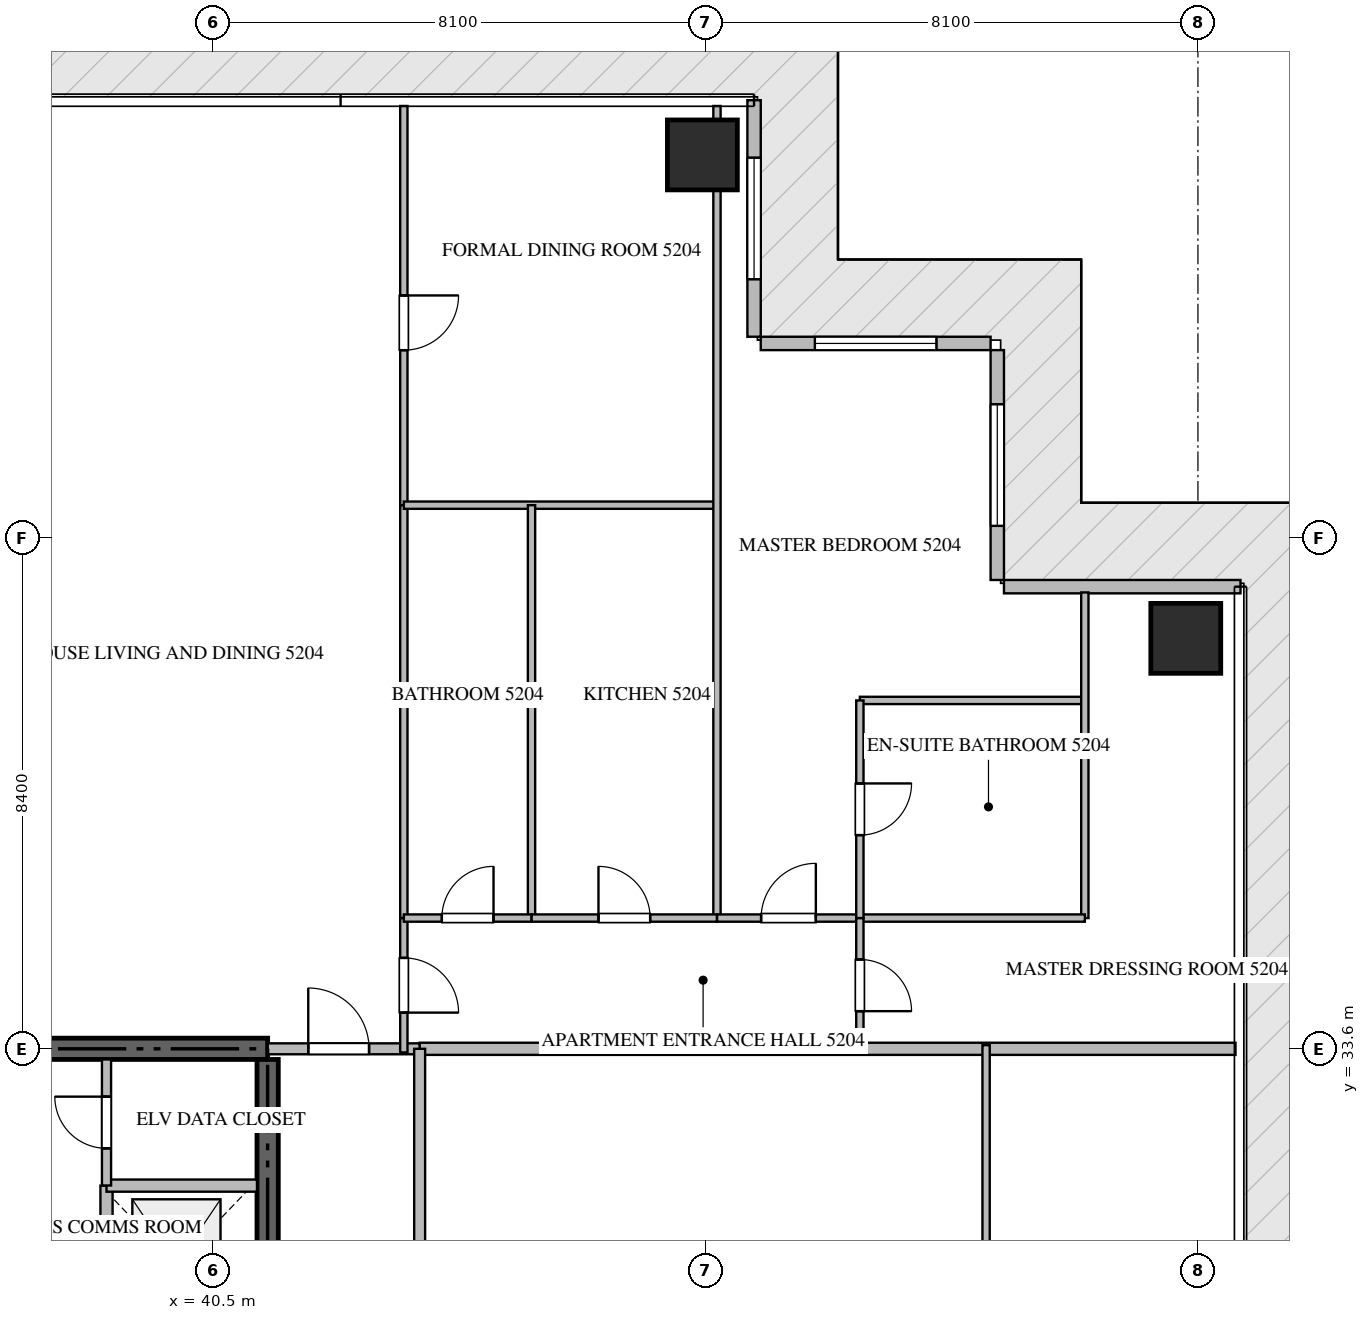
"""IFC4 building model, lengths in metres.
Left out: names, types, materials, properties, quantities, classifications, styles, units other than length and angle.
Written with IfcOpenShell. Run it as: python <this file> out.ifc"""

import sys

from ifc_helpers import new_model, si_unit, direction, frame, frame_2d, origin, origin_2d, place, context, subcontext, project, spatial, rectangle, extrude, source, transform, mapped, element, fill, save


model = new_model("IFC4")
c1 = context("Model", 3, precision=1e-05, world=origin(), true_north=direction((0.0, 1.0)))
c2 = subcontext(c1, "Body", "Model", "MODEL_VIEW")
j1 = project(units=[si_unit("LENGTHUNIT", "METRE"), si_unit("PLANEANGLEUNIT", "RADIAN")], contexts=[c1])
p1 = place(None, origin())
s1 = spatial("IfcSite", under=j1, at=p1, CompositionType="ELEMENT")
p2 = place(p1, origin())
s2 = spatial("IfcBuilding", under=s1, at=p2, CompositionType="ELEMENT")
p3 = place(p2, frame((0.0, 0.0, 210.45)))
s3 = spatial("IfcBuildingStorey", under=s2, at=p3, CompositionType="ELEMENT", Elevation=210.45)
p4 = place(p3, frame((41.4, 33.6, -0.44), z_axis=(0.0, 0.0, 1.0), x_axis=(-1.0, 0.0, 0.0)))
e1 = element("IfcWall", 1, at=p4, inside=s3, PredefinedType="SHEAR", context=c2, shape_type="SweptSolid", body=[
    extrude(rectangle(XDim=18.0, YDim=0.35, at=frame_2d((9.0, 0.0))), origin(), (0.0, 0.0, 1.0), 4.028),
])
p5 = place(p3, frame((41.4, 27.75, -0.44), z_axis=(0.0, 0.0, 1.0), x_axis=(0.0, 1.0, 0.0)))
e2 = element("IfcWall", 2, at=p5, inside=s3, PredefinedType="SHEAR", context=c2, shape_type="SweptSolid", body=[
    extrude(rectangle(XDim=5.675, YDim=0.35, at=frame_2d((2.837, 0.0))), origin(), (0.0, 0.0, 1.0), 4.028),
])
m1 = source(origin(), c2, "Body", "SweptSolid", [
    extrude(rectangle(XDim=1.15, YDim=1.15, at=origin_2d()), origin(), (0.0, 0.0, 1.0), 4.03),
])
for number, where, z_axis, x_axis in (
    (3, (48.55, 48.3, -0.44), (0.0, 0.0, 1.0), (1.0, 0.0, 0.0)),
    (4, (56.5, 40.35, -0.44), (0.0, 0.0, 1.0), (1.0, 0.0, 0.0)),
):
    element("IfcColumn", number, at=place(p3, frame(where, z_axis=z_axis, x_axis=x_axis)), inside=s3, PredefinedType="COLUMN", context=c2, shape_type="MappedRepresentation", body=[
        mapped(m1, transform((0.0, 0.0, 0.0), scale=1.0)),
    ])
p6 = place(p3, frame((57.4, 41.2, 0.0), z_axis=(0.0, 0.0, 1.0), x_axis=(-1.0, 0.0, 0.0)))
e5 = element("IfcWall", 5, at=p6, inside=s3, PredefinedType="ELEMENTEDWALL", context=c2, shape_type="SweptSolid", body=[
    extrude(rectangle(XDim=3.89, YDim=0.22, at=frame_2d((1.945, 0.0))), origin(), (0.0, 0.0, 1.0), 3.575),
])
p7 = place(p3, frame((53.4, 41.31, 0.0), z_axis=(0.0, 0.0, 1.0), x_axis=(0.0, 1.0, 0.0)))
e6 = element("IfcWall", 6, at=p7, inside=s3, PredefinedType="ELEMENTEDWALL", context=c2, shape_type="SweptSolid", body=[
    extrude(rectangle(XDim=3.78, YDim=0.22, at=frame_2d((1.89, 0.0))), origin(), (0.0, 0.0, 1.0), 3.575),
])
p8 = place(p7, frame((0.89, 0.0, 0.65)))
e7 = element("IfcOpeningElement", 7, at=p8, cuts=e6, PredefinedType="OPENING", context=c2, shape_type="SweptSolid", body=[
    extrude(rectangle(XDim=2.0, YDim=2.2, at=frame_2d((1.0, 1.1))), frame((0.0, 0.12, 0.0), z_axis=(0.0, -1.0, 0.0), x_axis=(1.0, 0.0, 0.0)), (0.0, 0.0, 1.0), 0.24),
])
p9 = place(p3, frame((53.29, 45.2, 0.0), z_axis=(0.0, 0.0, 1.0), x_axis=(-1.0, 0.0, 0.0)))
e8 = element("IfcWall", 8, at=p9, inside=s3, PredefinedType="ELEMENTEDWALL", context=c2, shape_type="SweptSolid", body=[
    extrude(rectangle(XDim=3.78, YDim=0.22, at=frame_2d((1.89, 0.0))), origin(), (0.0, 0.0, 1.0), 3.575),
])
p10 = place(p9, frame((0.89, 0.0, 0.65)))
e9 = element("IfcOpeningElement", 9, at=p10, cuts=e8, PredefinedType="OPENING", context=c2, shape_type="SweptSolid", body=[
    extrude(rectangle(XDim=2.0, YDim=2.2, at=frame_2d((1.0, 1.1))), frame((0.0, 0.12, 0.0), z_axis=(0.0, -1.0, 0.0), x_axis=(1.0, 0.0, 0.0)), (0.0, 0.0, 1.0), 0.24),
])
p11 = place(p3, frame((49.4, 45.31, 0.0), z_axis=(0.0, 0.0, 1.0), x_axis=(0.0, 1.0, 0.0)))
e10 = element("IfcWall", 10, at=p11, inside=s3, PredefinedType="ELEMENTEDWALL", context=c2, shape_type="SweptSolid", body=[
    extrude(rectangle(XDim=3.89, YDim=0.22, at=frame_2d((1.945, 0.0))), origin(), (0.0, 0.0, 1.0), 3.575),
])
p12 = place(p11, frame((0.945, 0.0, 0.65)))
e11 = element("IfcOpeningElement", 11, at=p12, cuts=e10, PredefinedType="OPENING", context=c2, shape_type="SweptSolid", body=[
    extrude(rectangle(XDim=2.0, YDim=2.2, at=frame_2d((1.0, 1.1))), frame((0.0, 0.12, 0.0), z_axis=(0.0, -1.0, 0.0), x_axis=(1.0, 0.0, 0.0)), (0.0, 0.0, 1.0), 0.24),
])
p13 = place(p3, frame((38.75, 28.85, 0.0), z_axis=(0.0, 0.0, 1.0), x_axis=(0.0, 1.0, 0.0)))
e12 = element("IfcWall", 12, at=p13, inside=s3, PredefinedType="STANDARD", context=c2, shape_type="SweptSolid", body=[
    extrude(rectangle(XDim=2.5, YDim=0.2, at=frame_2d((1.25, 0.0))), origin(), (0.0, 0.0, 1.0), 3.59),
])
p14 = place(p3, frame((38.75, 31.35, 0.0), z_axis=(0.0, 0.0, 1.0), x_axis=(1.0, 0.0, 0.0)))
e13 = element("IfcWall", 13, at=p14, inside=s3, PredefinedType="STANDARD", context=c2, shape_type="SweptSolid", body=[
    extrude(rectangle(XDim=2.475, YDim=0.2, at=frame_2d((1.238, 0.0))), origin(), (0.0, 0.0, 1.0), 3.59),
])
p15 = place(p3, frame((38.75, 31.352, 0.0), z_axis=(0.0, 0.0, 1.0), x_axis=(0.0, 1.0, 0.0)))
e14 = element("IfcWall", 14, at=p15, inside=s3, PredefinedType="PARTITIONING", context=c2, shape_type="SweptSolid", body=[
    extrude(rectangle(XDim=2.073, YDim=0.15, at=frame_2d((1.037, 0.0))), origin(), (0.0, 0.0, 1.0), 3.59),
])
p16 = place(p15, frame((0.611, 0.0, 0.0)))
e15 = element("IfcOpeningElement", 15, at=p16, cuts=e14, PredefinedType="OPENING", context=c2, shape_type="SweptSolid", body=[
    extrude(rectangle(XDim=0.85, YDim=2.1, at=frame_2d((0.425, 1.05))), frame((0.0, 0.085, 0.0), z_axis=(0.0, -1.0, 0.0), x_axis=(1.0, 0.0, 0.0)), (0.0, 0.0, 1.0), 0.17),
])
p17 = place(p3, frame((43.9, 33.6, 0.0), z_axis=(0.0, 0.0, 1.0), x_axis=(1.0, 0.0, 0.0)))
e16 = element("IfcWall", 16, at=p17, inside=s3, PredefinedType="PARTITIONING", context=c2, shape_type="SweptSolid", body=[
    extrude(rectangle(XDim=13.418, YDim=0.2, at=frame_2d((6.709, 0.0))), origin(), (0.0, 0.0, 1.0), 3.59),
])
p18 = place(p3, frame((41.402, 33.6, 0.0), z_axis=(0.0, 0.0, 1.0), x_axis=(1.0, 0.0, 0.0)))
e17 = element("IfcWall", 17, at=p18, inside=s3, PredefinedType="PARTITIONING", context=c2, shape_type="SweptSolid", body=[
    extrude(rectangle(XDim=2.496, YDim=0.18, at=frame_2d((1.248, 0.0))), origin(), (0.0, 0.0, 1.0), 3.59),
])
p19 = place(p18, frame((0.666, 0.0, 0.0)))
e18 = element("IfcOpeningElement", 18, at=p19, cuts=e17, PredefinedType="OPENING", context=c2, shape_type="SweptSolid", body=[
    extrude(rectangle(XDim=1.0, YDim=2.15, at=frame_2d((0.5, 1.075))), frame((0.0, 0.1, 0.0), z_axis=(0.0, -1.0, 0.0), x_axis=(1.0, 0.0, 0.0)), (0.0, 0.0, 1.0), 0.2),
])
p20 = place(p3, frame((43.9, 16.8, 0.0), z_axis=(0.0, 0.0, 1.0), x_axis=(0.0, 1.0, 0.0)))
e19 = element("IfcWall", 19, at=p20, inside=s3, PredefinedType="PARTITIONING", context=c2, shape_type="SweptSolid", body=[
    extrude(rectangle(XDim=16.8, YDim=0.18, at=frame_2d((8.4, 0.0))), origin(), (0.0, 0.0, 1.0), 3.59),
])
p21 = place(p20, frame((1.3, 0.0, 0.0)))
e20 = element("IfcOpeningElement", 20, at=p21, cuts=e19, PredefinedType="OPENING", context=c2, shape_type="SweptSolid", body=[
    extrude(rectangle(XDim=1.0, YDim=2.15, at=frame_2d((0.5, 1.075))), frame((0.0, 0.1, 0.0), z_axis=(0.0, -1.0, 0.0), x_axis=(1.0, 0.0, 0.0)), (0.0, 0.0, 1.0), 0.2),
])
p22 = place(p3, frame((43.64, 35.75, 0.0), z_axis=(0.0, 0.0, 1.0), x_axis=(0.0, -1.0, 0.0)))
e21 = element("IfcWall", 21, at=p22, inside=s3, PredefinedType="PARTITIONING", context=c2, shape_type="SweptSolid", body=[
    extrude(rectangle(XDim=2.21, YDim=0.12, at=frame_2d((1.105, 0.0))), origin(), (0.0, 0.0, 1.0), 3.59),
])
p23 = place(p22, frame((0.655, 0.0, 0.0)))
e22 = element("IfcOpeningElement", 22, at=p23, cuts=e21, PredefinedType="OPENING", context=c2, shape_type="SweptSolid", body=[
    extrude(rectangle(XDim=0.9, YDim=2.1, at=frame_2d((0.45, 1.05))), frame((0.0, 0.07, 0.0), z_axis=(0.0, -1.0, 0.0), x_axis=(1.0, 0.0, 0.0)), (0.0, 0.0, 1.0), 0.14),
])
p24 = place(p3, frame((43.64, 49.105, 0.0), z_axis=(0.0, 0.0, 1.0), x_axis=(0.0, -1.0, 0.0)))
e23 = element("IfcWall", 23, at=p24, inside=s3, PredefinedType="PARTITIONING", context=c2, shape_type="SweptSolid", body=[
    extrude(rectangle(XDim=6.565, YDim=0.12, at=frame_2d((3.282, 0.0))), origin(), (0.0, 0.0, 1.0), 3.59),
])
p25 = place(p24, frame((3.116, 0.0, 0.0)))
e24 = element("IfcOpeningElement", 24, at=p25, cuts=e23, PredefinedType="OPENING", context=c2, shape_type="SweptSolid", body=[
    extrude(rectangle(XDim=0.9, YDim=2.1, at=frame_2d((0.45, 1.05))), frame((0.0, 0.07, 0.0), z_axis=(0.0, -1.0, 0.0), x_axis=(1.0, 0.0, 0.0)), (0.0, 0.0, 1.0), 0.14),
])
p26 = place(p3, frame((43.64, 42.538, 0.0), z_axis=(0.0, 0.0, 1.0), x_axis=(0.0, -1.0, 0.0)))
e25 = element("IfcWall", 25, at=p26, inside=s3, PredefinedType="PARTITIONING", context=c2, shape_type="SweptSolid", body=[
    extrude(rectangle(XDim=6.786, YDim=0.12, at=frame_2d((3.393, 0.0))), origin(), (0.0, 0.0, 1.0), 3.59),
])
p27 = place(p3, frame((43.64, 42.54, 0.0), z_axis=(0.0, 0.0, 1.0), x_axis=(1.0, 0.0, 0.0)))
e26 = element("IfcWall", 26, at=p27, inside=s3, PredefinedType="PARTITIONING", context=c2, shape_type="SweptSolid", body=[
    extrude(rectangle(XDim=5.15, YDim=0.12, at=frame_2d((2.575, 0.0))), origin(), (0.0, 0.0, 1.0), 3.59),
])
p28 = place(p3, frame((48.79, 49.105, 0.0), z_axis=(0.0, 0.0, 1.0), x_axis=(0.0, -1.0, 0.0)))
e27 = element("IfcWall", 27, at=p28, inside=s3, PredefinedType="PARTITIONING", context=c2, shape_type="SweptSolid", body=[
    extrude(rectangle(XDim=13.355, YDim=0.12, at=frame_2d((6.677, 0.0))), origin(), (0.0, 0.0, 1.0), 3.122),
])
p29 = place(p3, frame((45.74, 42.54, 0.0), z_axis=(0.0, 0.0, 1.0), x_axis=(0.0, -1.0, 0.0)))
e28 = element("IfcWall", 28, at=p29, inside=s3, PredefinedType="PARTITIONING", context=c2, shape_type="SweptSolid", body=[
    extrude(rectangle(XDim=6.79, YDim=0.12, at=frame_2d((3.395, 0.0))), origin(), (0.0, 0.0, 1.0), 3.59),
])
p30 = place(p3, frame((43.64, 35.75, 0.0), z_axis=(0.0, 0.0, 1.0), x_axis=(1.0, 0.0, 0.0)))
e29 = element("IfcWall", 29, at=p30, inside=s3, PredefinedType="PARTITIONING", context=c2, shape_type="SweptSolid", body=[
    extrude(rectangle(XDim=2.1, YDim=0.12, at=frame_2d((1.05, 0.0))), origin(), (0.0, 0.0, 1.0), 3.59),
])
p31 = place(p30, frame((0.625, 0.0, 0.0)))
e30 = element("IfcOpeningElement", 30, at=p31, cuts=e29, PredefinedType="OPENING", context=c2, shape_type="SweptSolid", body=[
    extrude(rectangle(XDim=0.85, YDim=2.1, at=frame_2d((0.425, 1.05))), frame((0.0, 0.07, 0.0), z_axis=(0.0, -1.0, 0.0), x_axis=(1.0, 0.0, 0.0)), (0.0, 0.0, 1.0), 0.14),
])
p32 = place(p3, frame((45.742, 35.75, 0.0), z_axis=(0.0, 0.0, 1.0), x_axis=(1.0, 0.0, 0.0)))
e31 = element("IfcWall", 31, at=p32, inside=s3, PredefinedType="PARTITIONING", context=c2, shape_type="SweptSolid", body=[
    extrude(rectangle(XDim=3.048, YDim=0.12, at=frame_2d((1.524, 0.0))), origin(), (0.0, 0.0, 1.0), 3.59),
])
p33 = place(p32, frame((1.099, 0.0, 0.0)))
e32 = element("IfcOpeningElement", 32, at=p33, cuts=e31, PredefinedType="OPENING", context=c2, shape_type="SweptSolid", body=[
    extrude(rectangle(XDim=0.85, YDim=2.1, at=frame_2d((0.425, 1.05))), frame((0.0, 0.07, 0.0), z_axis=(0.0, -1.0, 0.0), x_axis=(1.0, 0.0, 0.0)), (0.0, 0.0, 1.0), 0.14),
])
p34 = place(p3, frame((48.792, 35.75, 0.0), z_axis=(0.0, 0.0, 1.0), x_axis=(1.0, 0.0, 0.0)))
e33 = element("IfcWall", 33, at=p34, inside=s3, PredefinedType="PARTITIONING", context=c2, shape_type="SweptSolid", body=[
    extrude(rectangle(XDim=2.348, YDim=0.12, at=frame_2d((1.174, 0.0))), origin(), (0.0, 0.0, 1.0), 3.59),
])
p35 = place(p34, frame((0.724, 0.0, 0.0)))
e34 = element("IfcOpeningElement", 34, at=p35, cuts=e33, PredefinedType="OPENING", context=c2, shape_type="SweptSolid", body=[
    extrude(rectangle(XDim=0.9, YDim=2.1, at=frame_2d((0.45, 1.05))), frame((0.0, 0.07, 0.0), z_axis=(0.0, -1.0, 0.0), x_axis=(1.0, 0.0, 0.0)), (0.0, 0.0, 1.0), 0.14),
])
p36 = place(p3, frame((51.14, 39.329, 0.0), z_axis=(0.0, 0.0, 1.0), x_axis=(1.0, 0.0, 0.0)))
e35 = element("IfcWall", 35, at=p36, inside=s3, PredefinedType="PARTITIONING", context=c2, shape_type="SweptSolid", body=[
    extrude(rectangle(XDim=3.7, YDim=0.12, at=frame_2d((1.85, 0.0))), origin(), (0.0, 0.0, 1.0), 3.59),
])
p37 = place(p3, frame((54.84, 41.105, 0.0), z_axis=(0.0, 0.0, 1.0), x_axis=(0.0, -1.0, 0.0)))
e36 = element("IfcWall", 36, at=p37, inside=s3, PredefinedType="PARTITIONING", context=c2, shape_type="SweptSolid", body=[
    extrude(rectangle(XDim=5.355, YDim=0.12, at=frame_2d((2.677, 0.0))), origin(), (0.0, 0.0, 1.0), 3.59),
])
p38 = place(p3, frame((51.142, 35.75, 0.0), z_axis=(0.0, 0.0, 1.0), x_axis=(1.0, 0.0, 0.0)))
e37 = element("IfcWall", 37, at=p38, inside=s3, PredefinedType="PARTITIONING", context=c2, shape_type="SweptSolid", body=[
    extrude(rectangle(XDim=3.698, YDim=0.12, at=frame_2d((1.849, 0.0))), origin(), (0.0, 0.0, 1.0), 3.59),
])
p39 = place(p3, frame((51.14, 39.329, 0.0), z_axis=(0.0, 0.0, 1.0), x_axis=(0.0, -1.0, 0.0)))
e38 = element("IfcWall", 38, at=p39, inside=s3, PredefinedType="PARTITIONING", context=c2, shape_type="SweptSolid", body=[
    extrude(rectangle(XDim=3.579, YDim=0.12, at=frame_2d((1.79, 0.0))), origin(), (0.0, 0.0, 1.0), 3.59),
])
p40 = place(p39, frame((1.365, 0.0, 0.0)))
e39 = element("IfcOpeningElement", 39, at=p40, cuts=e38, PredefinedType="OPENING", context=c2, shape_type="SweptSolid", body=[
    extrude(rectangle(XDim=0.85, YDim=2.1, at=frame_2d((0.425, 1.05))), frame((0.0, 0.07, 0.0), z_axis=(0.0, -1.0, 0.0), x_axis=(1.0, 0.0, 0.0)), (0.0, 0.0, 1.0), 0.14),
])
p41 = place(p3, frame((51.14, 35.748, 0.0), z_axis=(0.0, 0.0, 1.0), x_axis=(0.0, -1.0, 0.0)))
e40 = element("IfcWall", 40, at=p41, inside=s3, PredefinedType="PARTITIONING", context=c2, shape_type="SweptSolid", body=[
    extrude(rectangle(XDim=2.208, YDim=0.12, at=frame_2d((1.104, 0.0))), origin(), (0.0, 0.0, 1.0), 3.59),
])
p42 = place(p41, frame((0.679, 0.0, 0.0)))
e41 = element("IfcOpeningElement", 41, at=p42, cuts=e40, PredefinedType="OPENING", context=c2, shape_type="SweptSolid", body=[
    extrude(rectangle(XDim=0.85, YDim=2.1, at=frame_2d((0.425, 1.05))), frame((0.0, 0.07, 0.0), z_axis=(0.0, -1.0, 0.0), x_axis=(1.0, 0.0, 0.0)), (0.0, 0.0, 1.0), 0.14),
])
p43 = place(p3, frame((53.216, 23.18, 0.0), z_axis=(0.0, 0.0, 1.0), x_axis=(0.0, 1.0, 0.0)))
e42 = element("IfcWall", 42, at=p43, inside=s3, PredefinedType="PARTITIONING", context=c2, shape_type="SweptSolid", body=[
    extrude(rectangle(XDim=10.48, YDim=0.12, at=frame_2d((5.24, 0.0))), origin(), (0.0, 0.0, 1.0), 3.59),
])
m2 = source(origin(), c2, "Body", "SweptSolid", [
    extrude(rectangle(XDim=2.0, YDim=2.2, at=frame_2d((1.0, 1.1))), frame((0.0, 0.03, 0.0), z_axis=(0.0, -1.0, 0.0), x_axis=(1.0, 0.0, 0.0)), (0.0, 0.0, 1.0), 0.06),
])
p44 = place(p8, origin())
e43 = element("IfcWindow", 43, at=p44, inside=s3, PartitioningType="SINGLE_PANEL", PredefinedType="WINDOW", context=c2, shape_type="MappedRepresentation", body=[
    mapped(m2, transform((0.0, 0.0, 0.0), scale=1.0)),
])
fill(e7, e43)
p45 = place(p10, origin())
e44 = element("IfcWindow", 44, at=p45, inside=s3, PartitioningType="SINGLE_PANEL", PredefinedType="WINDOW", context=c2, shape_type="MappedRepresentation", body=[
    mapped(m2, transform((0.0, 0.0, 0.0), scale=1.0)),
])
fill(e9, e44)
p46 = place(p12, origin())
e45 = element("IfcWindow", 45, at=p46, inside=s3, PartitioningType="SINGLE_PANEL", PredefinedType="WINDOW", context=c2, shape_type="MappedRepresentation", body=[
    mapped(m2, transform((0.0, 0.0, 0.0), scale=1.0)),
])
fill(e11, e45)
m3 = source(origin(), c2, "Body", "SweptSolid", [
    extrude(rectangle(XDim=0.85, YDim=2.1, at=frame_2d((0.425, 1.05))), frame((0.0, 0.025, 0.0), z_axis=(0.0, -1.0, 0.0), x_axis=(1.0, 0.0, 0.0)), (0.0, 0.0, 1.0), 0.05),
])
p47 = place(p16, origin())
e46 = element("IfcDoor", 46, at=p47, inside=s3, OperationType="SINGLE_SWING_RIGHT", PredefinedType="DOOR", context=c2, shape_type="MappedRepresentation", body=[
    mapped(m3, transform((0.0, 0.0, 0.0), scale=1.0)),
])
fill(e15, e46)
m4 = source(origin(), c2, "Body", "SweptSolid", [
    extrude(rectangle(XDim=1.0, YDim=2.15, at=frame_2d((0.5, 1.075))), frame((0.0, 0.025, 0.0), z_axis=(0.0, -1.0, 0.0), x_axis=(1.0, 0.0, 0.0)), (0.0, 0.0, 1.0), 0.05),
])
p48 = place(p19, origin())
e47 = element("IfcDoor", 47, at=p48, inside=s3, OperationType="SINGLE_SWING_LEFT", PredefinedType="DOOR", context=c2, shape_type="MappedRepresentation", body=[
    mapped(m4, transform((0.0, 0.0, 0.0), scale=1.0)),
])
fill(e18, e47)
m5 = source(origin(), c2, "Body", "SweptSolid", [
    extrude(rectangle(XDim=0.9, YDim=2.1, at=frame_2d((0.45, 1.05))), frame((0.0, 0.025, 0.0), z_axis=(0.0, -1.0, 0.0), x_axis=(1.0, 0.0, 0.0)), (0.0, 0.0, 1.0), 0.05),
])
p49 = place(p23, origin())
e48 = element("IfcDoor", 48, at=p49, inside=s3, OperationType="SINGLE_SWING_RIGHT", PredefinedType="DOOR", context=c2, shape_type="MappedRepresentation", body=[
    mapped(m5, transform((0.0, 0.0, 0.0), scale=1.0)),
])
fill(e22, e48)
p50 = place(p25, origin())
e49 = element("IfcDoor", 49, at=p50, inside=s3, OperationType="SINGLE_SWING_LEFT", PredefinedType="DOOR", context=c2, shape_type="MappedRepresentation", body=[
    mapped(m5, transform((0.0, 0.0, 0.0), scale=1.0)),
])
fill(e24, e49)
p51 = place(p31, origin())
e50 = element("IfcDoor", 50, at=p51, inside=s3, OperationType="SINGLE_SWING_RIGHT", PredefinedType="DOOR", context=c2, shape_type="MappedRepresentation", body=[
    mapped(m3, transform((0.0, 0.0, 0.0), scale=1.0)),
])
fill(e30, e50)
p52 = place(p33, origin())
e51 = element("IfcDoor", 51, at=p52, inside=s3, OperationType="SINGLE_SWING_LEFT", PredefinedType="DOOR", context=c2, shape_type="MappedRepresentation", body=[
    mapped(m3, transform((0.0, 0.0, 0.0), scale=1.0)),
])
fill(e32, e51)
p53 = place(p35, origin())
e52 = element("IfcDoor", 52, at=p53, inside=s3, OperationType="SINGLE_SWING_RIGHT", PredefinedType="DOOR", context=c2, shape_type="MappedRepresentation", body=[
    mapped(m5, transform((0.0, 0.0, 0.0), scale=1.0)),
])
fill(e34, e52)
p54 = place(p40, origin())
e53 = element("IfcDoor", 53, at=p54, inside=s3, OperationType="SINGLE_SWING_LEFT", PredefinedType="DOOR", context=c2, shape_type="MappedRepresentation", body=[
    mapped(m3, transform((0.0, 0.0, 0.0), scale=1.0)),
])
fill(e39, e53)
p55 = place(p42, origin())
e54 = element("IfcDoor", 54, at=p55, inside=s3, OperationType="SINGLE_SWING_RIGHT", PredefinedType="DOOR", context=c2, shape_type="MappedRepresentation", body=[
    mapped(m3, transform((0.0, 0.0, 0.0), scale=1.0)),
])
fill(e41, e54)
save(model, sys.argv[1])
